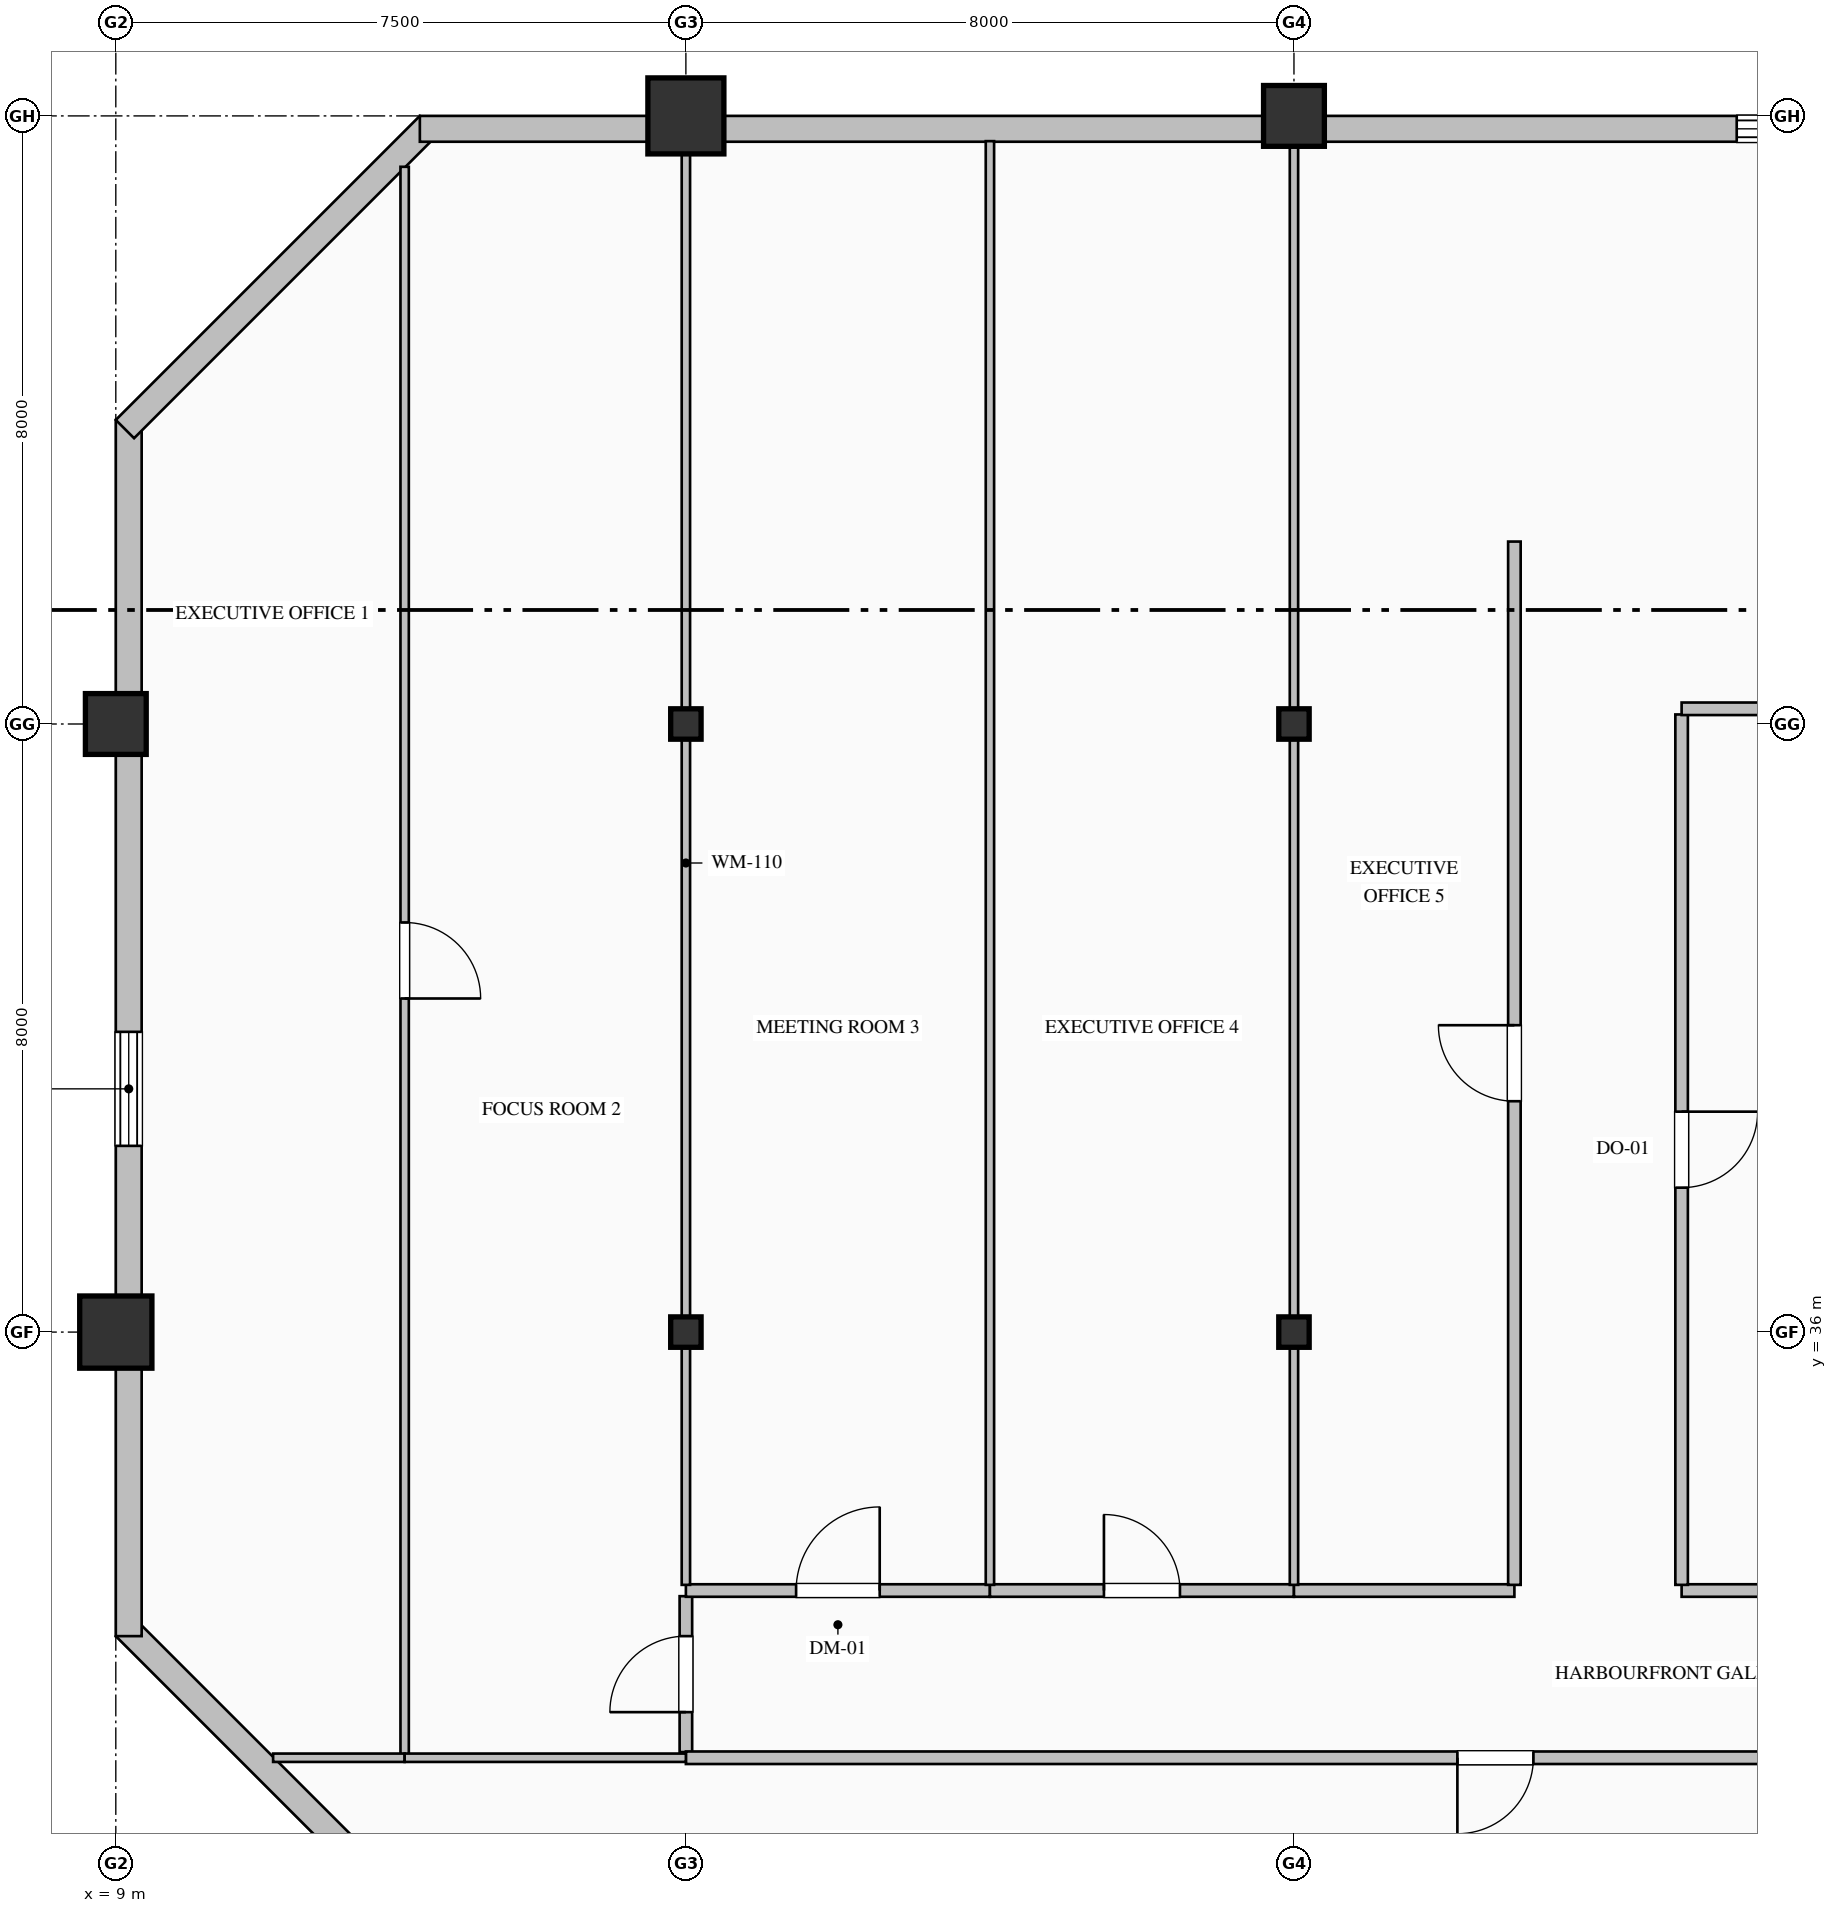
"""IFC4 building model, lengths in metres.
Left out: names, types, materials, properties, quantities, classifications, styles, units other than length and angle.
Written with IfcOpenShell. Run it as: python <this file> out.ifc"""

import sys

from ifc_helpers import new_model, si_unit, direction, frame, frame_2d, origin, origin_2d, place, context, subcontext, project, spatial, rectangle, hollow_rectangle, hollow_circle, i_section, extrude, element, fill, save


model = new_model("IFC4")
c1 = context("Model", 3, precision=1e-05, world=origin(), true_north=direction((0.0, 1.0)))
c2 = subcontext(c1, "Body", "Model", "MODEL_VIEW")
j1 = project(units=[si_unit("LENGTHUNIT", "METRE"), si_unit("PLANEANGLEUNIT", "RADIAN")], contexts=[c1])
p1 = place(None, origin())
s1 = spatial("IfcSite", under=j1, at=p1, CompositionType="ELEMENT")
p2 = place(p1, origin())
s2 = spatial("IfcBuilding", under=s1, at=p2, CompositionType="ELEMENT")
p3 = place(p2, frame((0.0, 0.0, 205.8)))
s3 = spatial("IfcBuildingStorey", under=s2, at=p3, CompositionType="ELEMENT", Elevation=205.8)
p4 = place(p3, frame((9.0, 36.0, 0.0), z_axis=(0.0, 0.0, 1.0), x_axis=(1.0, 0.0, 0.0)))
e1 = element("IfcColumn", 1, at=p4, inside=s3, PredefinedType="COLUMN", context=c2, shape_type="SweptSolid", body=[
    extrude(hollow_rectangle(XDim=0.95, YDim=0.95, WallThickness=0.036, at=origin_2d()), origin(), (0.0, 0.0, 1.0), 4.0),
])
p5 = place(p3, frame((9.0, 44.0, 0.0), z_axis=(0.0, 0.0, 1.0), x_axis=(1.0, 0.0, 0.0)))
e2 = element("IfcColumn", 2, at=p5, inside=s3, PredefinedType="COLUMN", context=c2, shape_type="SweptSolid", body=[
    extrude(hollow_rectangle(XDim=0.8, YDim=0.8, WallThickness=0.032, at=origin_2d()), origin(), (0.0, 0.0, 1.0), 4.0),
])
for number, where, z_axis, x_axis in (
    (3, (16.5, 36.0, 0.0), (0.0, 0.0, 1.0), (1.0, 0.0, 0.0)),
    (4, (16.5, 44.0, 0.0), (0.0, 0.0, 1.0), (1.0, 0.0, 0.0)),
):
    element("IfcColumn", number, at=place(p3, frame(where, z_axis=z_axis, x_axis=x_axis)), inside=s3, PredefinedType="COLUMN", context=c2, shape_type="SweptSolid", body=[
        extrude(i_section(OverallWidth=0.4, OverallDepth=0.4, WebThickness=0.013, FlangeThickness=0.021, FilletRadius=0.022, at=origin_2d()), origin(), (0.0, 0.0, 1.0), 4.0),
    ])
p6 = place(p3, frame((16.5, 52.0, 0.0), z_axis=(0.0, 0.0, 1.0), x_axis=(1.0, 0.0, 0.0)))
e5 = element("IfcColumn", 5, at=p6, inside=s3, PredefinedType="COLUMN", context=c2, shape_type="SweptSolid", body=[
    extrude(hollow_circle(Radius=0.5, WallThickness=0.036, at=origin_2d()), origin(), (0.0, 0.0, 1.0), 4.0),
])
for number, where, z_axis, x_axis in (
    (6, (24.5, 36.0, 0.0), (0.0, 0.0, 1.0), (1.0, 0.0, 0.0)),
    (7, (24.5, 44.0, 0.0), (0.0, 0.0, 1.0), (1.0, 0.0, 0.0)),
):
    element("IfcColumn", number, at=place(p3, frame(where, z_axis=z_axis, x_axis=x_axis)), inside=s3, PredefinedType="COLUMN", context=c2, shape_type="SweptSolid", body=[
        extrude(i_section(OverallWidth=0.4, OverallDepth=0.4, WebThickness=0.013, FlangeThickness=0.021, FilletRadius=0.022, at=origin_2d()), origin(), (0.0, 0.0, 1.0), 4.0),
    ])
p7 = place(p3, frame((24.5, 52.0, 0.0), z_axis=(0.0, 0.0, 1.0), x_axis=(1.0, 0.0, 0.0)))
e8 = element("IfcColumn", 8, at=p7, inside=s3, PredefinedType="COLUMN", context=c2, shape_type="SweptSolid", body=[
    extrude(hollow_rectangle(XDim=0.8, YDim=0.8, WallThickness=0.032, at=origin_2d()), origin(), (0.0, 0.0, 1.0), 4.0),
])
p8 = place(p3, frame((13.12, 28.12, 0.0), z_axis=(0.0, 0.0, 1.0), x_axis=(-0.707106781187, 0.707106781187, 0.0)))
e9 = element("IfcWall", 9, at=p8, inside=s3, PredefinedType="SOLIDWALL", context=c2, shape_type="SweptSolid", body=[
    extrude(rectangle(XDim=5.657, YDim=0.34, at=frame_2d((2.828, 0.0))), origin(), (0.0, 0.0, 1.0), 3.775),
])
p9 = place(p3, frame((9.17, 32.0, 0.0), z_axis=(0.0, 0.0, 1.0), x_axis=(0.0, 1.0, 0.0)))
e10 = element("IfcWall", 10, at=p9, inside=s3, PredefinedType="SOLIDWALL", context=c2, shape_type="SweptSolid", body=[
    extrude(rectangle(XDim=16.0, YDim=0.34, at=frame_2d((8.0, 0.0))), origin(), (0.0, 0.0, 1.0), 3.325),
])
p10 = place(p9, frame((6.45, 0.0, 0.7)))
e11 = element("IfcOpeningElement", 11, at=p10, cuts=e10, PredefinedType="OPENING", context=c2, shape_type="SweptSolid", body=[
    extrude(rectangle(XDim=1.5, YDim=2.4, at=frame_2d((0.75, 1.2))), frame((0.0, 0.18, 0.0), z_axis=(0.0, -1.0, 0.0), x_axis=(1.0, 0.0, 0.0)), (0.0, 0.0, 1.0), 0.36),
])
p11 = place(p3, frame((9.12, 47.88, 0.0), z_axis=(0.0, 0.0, 1.0), x_axis=(0.707106781187, 0.707106781187, 0.0)))
e12 = element("IfcWall", 12, at=p11, inside=s3, PredefinedType="SOLIDWALL", context=c2, shape_type="SweptSolid", body=[
    extrude(rectangle(XDim=5.657, YDim=0.34, at=frame_2d((2.828, 0.0))), origin(), (0.0, 0.0, 1.0), 3.775),
])
p12 = place(p3, frame((13.0, 51.83, 0.0), z_axis=(0.0, 0.0, 1.0), x_axis=(1.0, 0.0, 0.0)))
e13 = element("IfcWall", 13, at=p12, inside=s3, PredefinedType="SOLIDWALL", context=c2, shape_type="SweptSolid", body=[
    extrude(rectangle(XDim=27.52, YDim=0.34, at=frame_2d((13.76, 0.0))), origin(), (0.0, 0.0, 1.0), 3.325),
])
p13 = place(p12, frame((17.325, 0.0, 0.9)))
e14 = element("IfcOpeningElement", 14, at=p13, cuts=e13, PredefinedType="OPENING", context=c2, shape_type="SweptSolid", body=[
    extrude(rectangle(XDim=1.35, YDim=1.85, at=frame_2d((0.675, 0.925))), frame((0.0, 0.18, 0.0), z_axis=(0.0, -1.0, 0.0), x_axis=(1.0, 0.0, 0.0)), (0.0, 0.0, 1.0), 0.36),
])
p14 = place(p3, frame((29.6, 32.6, 0.0), z_axis=(0.0, 0.0, 1.0), x_axis=(1.0, 0.0, 0.0)))
e15 = element("IfcWall", 15, at=p14, inside=s3, PredefinedType="PARTITIONING", context=c2, shape_type="SweptSolid", body=[
    extrude(rectangle(XDim=8.2, YDim=0.165, at=frame_2d((4.1, 0.0))), origin(), (0.0, 0.0, 1.0), 3.775),
])
p15 = place(p3, frame((16.5, 30.475, 0.0), z_axis=(0.0, 0.0, 1.0), x_axis=(0.0, 1.0, 0.0)))
e16 = element("IfcWall", 16, at=p15, inside=s3, PredefinedType="PARTITIONING", context=c2, shape_type="SweptSolid", body=[
    extrude(rectangle(XDim=2.051, YDim=0.165, at=frame_2d((1.025, 0.0))), origin(), (0.0, 0.0, 1.0), 3.179),
])
p16 = place(p15, frame((0.525, 0.0, 0.0)))
e17 = element("IfcOpeningElement", 17, at=p16, cuts=e16, PredefinedType="OPENING", context=c2, shape_type="SweptSolid", body=[
    extrude(rectangle(XDim=1.0, YDim=2.15, at=frame_2d((0.5, 1.075))), frame((0.0, 0.093, 0.0), z_axis=(0.0, -1.0, 0.0), x_axis=(1.0, 0.0, 0.0)), (0.0, 0.0, 1.0), 0.185),
])
p17 = place(p3, frame((16.5, 32.6, 0.0), z_axis=(0.0, 0.0, 1.0), x_axis=(1.0, 0.0, 0.0)))
e18 = element("IfcWall", 18, at=p17, inside=s3, PredefinedType="PARTITIONING", context=c2, shape_type="SweptSolid", body=[
    extrude(rectangle(XDim=4.0, YDim=0.165, at=frame_2d((2.0, 0.0))), origin(), (0.0, 0.0, 1.0), 3.775),
])
p18 = place(p17, frame((1.45, 0.0, 0.0)))
e19 = element("IfcOpeningElement", 19, at=p18, cuts=e18, PredefinedType="OPENING", context=c2, shape_type="SweptSolid", body=[
    extrude(rectangle(XDim=1.1, YDim=2.2, at=frame_2d((0.55, 1.1))), frame((0.0, 0.093, 0.0), z_axis=(0.0, -1.0, 0.0), x_axis=(1.0, 0.0, 0.0)), (0.0, 0.0, 1.0), 0.185),
])
p19 = place(p3, frame((20.5, 32.6, 0.0), z_axis=(0.0, 0.0, 1.0), x_axis=(1.0, 0.0, 0.0)))
e20 = element("IfcWall", 20, at=p19, inside=s3, PredefinedType="PARTITIONING", context=c2, shape_type="SweptSolid", body=[
    extrude(rectangle(XDim=4.0, YDim=0.165, at=frame_2d((2.0, 0.0))), origin(), (0.0, 0.0, 1.0), 3.775),
])
p20 = place(p19, frame((1.5, 0.0, 0.0)))
e21 = element("IfcOpeningElement", 21, at=p20, cuts=e20, PredefinedType="OPENING", context=c2, shape_type="SweptSolid", body=[
    extrude(rectangle(XDim=1.0, YDim=2.15, at=frame_2d((0.5, 1.075))), frame((0.0, 0.093, 0.0), z_axis=(0.0, -1.0, 0.0), x_axis=(1.0, 0.0, 0.0)), (0.0, 0.0, 1.0), 0.185),
])
p21 = place(p3, frame((24.5, 32.6, 0.0), z_axis=(0.0, 0.0, 1.0), x_axis=(1.0, 0.0, 0.0)))
e22 = element("IfcWall", 22, at=p21, inside=s3, PredefinedType="PARTITIONING", context=c2, shape_type="SweptSolid", body=[
    extrude(rectangle(XDim=2.9, YDim=0.165, at=frame_2d((1.45, 0.0))), origin(), (0.0, 0.0, 1.0), 3.775),
])
p22 = place(p3, frame((37.8, 30.4, 0.0), z_axis=(0.0, 0.0, 1.0), x_axis=(-1.0, 0.0, 0.0)))
e23 = element("IfcWall", 23, at=p22, inside=s3, PredefinedType="PARTITIONING", context=c2, shape_type="SweptSolid", body=[
    extrude(rectangle(XDim=21.3, YDim=0.165, at=frame_2d((10.65, 0.0))), origin(), (0.0, 0.0, 1.0), 3.775),
])
p23 = place(p22, frame((10.15, 0.0, 0.0)))
e24 = element("IfcOpeningElement", 24, at=p23, cuts=e23, PredefinedType="OPENING", context=c2, shape_type="SweptSolid", body=[
    extrude(rectangle(XDim=1.0, YDim=2.15, at=frame_2d((0.5, 1.075))), frame((0.0, 0.093, 0.0), z_axis=(0.0, -1.0, 0.0), x_axis=(1.0, 0.0, 0.0)), (0.0, 0.0, 1.0), 0.185),
])
p24 = place(p3, frame((29.6, 44.125, 0.0), z_axis=(0.0, 0.0, 1.0), x_axis=(0.0, -1.0, 0.0)))
e25 = element("IfcWall", 25, at=p24, inside=s3, PredefinedType="PARTITIONING", context=c2, shape_type="SweptSolid", body=[
    extrude(rectangle(XDim=11.451, YDim=0.165, at=frame_2d((5.726, 0.0))), origin(), (0.0, 0.0, 1.0), 3.775),
])
p25 = place(p24, frame((5.226, 0.0, 0.0)))
e26 = element("IfcOpeningElement", 26, at=p25, cuts=e25, PredefinedType="OPENING", context=c2, shape_type="SweptSolid", body=[
    extrude(rectangle(XDim=1.0, YDim=2.15, at=frame_2d((0.5, 1.075))), frame((0.0, 0.093, 0.0), z_axis=(0.0, -1.0, 0.0), x_axis=(1.0, 0.0, 0.0)), (0.0, 0.0, 1.0), 0.185),
])
p26 = place(p3, frame((27.4, 32.675, 0.0), z_axis=(0.0, 0.0, 1.0), x_axis=(0.0, 1.0, 0.0)))
e27 = element("IfcWall", 27, at=p26, inside=s3, PredefinedType="PARTITIONING", context=c2, shape_type="SweptSolid", body=[
    extrude(rectangle(XDim=13.725, YDim=0.165, at=frame_2d((6.863, 0.0))), origin(), (0.0, 0.0, 1.0), 3.775),
])
p27 = place(p26, frame((6.363, 0.0, 0.0)))
e28 = element("IfcOpeningElement", 28, at=p27, cuts=e27, PredefinedType="OPENING", context=c2, shape_type="SweptSolid", body=[
    extrude(rectangle(XDim=1.0, YDim=2.15, at=frame_2d((0.5, 1.075))), frame((0.0, 0.093, 0.0), z_axis=(0.0, -1.0, 0.0), x_axis=(1.0, 0.0, 0.0)), (0.0, 0.0, 1.0), 0.185),
])
p28 = place(p3, frame((37.8, 44.2, 0.0), z_axis=(0.0, 0.0, 1.0), x_axis=(-1.0, 0.0, 0.0)))
e29 = element("IfcWall", 29, at=p28, inside=s3, PredefinedType="PARTITIONING", context=c2, shape_type="SweptSolid", body=[
    extrude(rectangle(XDim=8.2, YDim=0.165, at=frame_2d((4.1, 0.0))), origin(), (0.0, 0.0, 1.0), 3.775),
])
p29 = place(p3, frame((12.8, 51.331, 0.0), z_axis=(0.0, 0.0, 1.0), x_axis=(0.0, -1.0, 0.0)))
e30 = element("IfcWall", 30, at=p29, inside=s3, PredefinedType="MOVABLE", context=c2, shape_type="SweptSolid", body=[
    extrude(rectangle(XDim=20.884, YDim=0.11, at=frame_2d((10.442, 0.0))), origin(), (0.0, 0.0, 1.0), 3.775),
])
p30 = place(p29, frame((9.942, 0.0, 0.0)))
e31 = element("IfcOpeningElement", 31, at=p30, cuts=e30, PredefinedType="OPENING", context=c2, shape_type="SweptSolid", body=[
    extrude(rectangle(XDim=1.0, YDim=2.15, at=frame_2d((0.5, 1.075))), frame((0.0, 0.065, 0.0), z_axis=(0.0, -1.0, 0.0), x_axis=(1.0, 0.0, 0.0)), (0.0, 0.0, 1.0), 0.13),
])
p31 = place(p3, frame((12.8, 30.4, 0.0), z_axis=(0.0, 0.0, 1.0), x_axis=(-1.0, 0.0, 0.0)))
e32 = element("IfcWall", 32, at=p31, inside=s3, PredefinedType="MOVABLE", context=c2, shape_type="SweptSolid", body=[
    extrude(rectangle(XDim=1.73, YDim=0.11, at=frame_2d((0.865, 0.0))), origin(), (0.0, 0.0, 1.0), 3.775),
])
p32 = place(p3, frame((16.5, 51.668, 0.0), z_axis=(0.0, 0.0, 1.0), x_axis=(0.0, -1.0, 0.0)))
e33 = element("IfcWall", 33, at=p32, inside=s3, PredefinedType="MOVABLE", context=c2, shape_type="SweptSolid", body=[
    extrude(rectangle(XDim=18.993, YDim=0.11, at=frame_2d((9.497, 0.0))), origin(), (0.0, 0.0, 1.0), 3.179),
])
p33 = place(p3, frame((16.5, 30.4, 0.0), z_axis=(0.0, 0.0, 1.0), x_axis=(-1.0, 0.0, 0.0)))
e34 = element("IfcWall", 34, at=p33, inside=s3, PredefinedType="MOVABLE", context=c2, shape_type="SweptSolid", body=[
    extrude(rectangle(XDim=3.7, YDim=0.11, at=frame_2d((1.85, 0.0))), origin(), (0.0, 0.0, 1.0), 3.775),
])
p34 = place(p3, frame((20.5, 51.668, 0.0), z_axis=(0.0, 0.0, 1.0), x_axis=(0.0, -1.0, 0.0)))
e35 = element("IfcWall", 35, at=p34, inside=s3, PredefinedType="MOVABLE", context=c2, shape_type="SweptSolid", body=[
    extrude(rectangle(XDim=18.993, YDim=0.11, at=frame_2d((9.497, 0.0))), origin(), (0.0, 0.0, 1.0), 3.775),
])
p35 = place(p3, frame((24.5, 51.668, 0.0), z_axis=(0.0, 0.0, 1.0), x_axis=(0.0, -1.0, 0.0)))
e36 = element("IfcWall", 36, at=p35, inside=s3, PredefinedType="MOVABLE", context=c2, shape_type="SweptSolid", body=[
    extrude(rectangle(XDim=18.993, YDim=0.11, at=frame_2d((9.497, 0.0))), origin(), (0.0, 0.0, 1.0), 3.179),
])
p36 = place(p10, origin())
e37 = element("IfcWindow", 37, at=p36, inside=s3, PartitioningType="DOUBLE_PANEL_HORIZONTAL", PredefinedType="WINDOW", context=c2, shape_type="SweptSolid", body=[
    extrude(rectangle(XDim=1.5, YDim=2.4, at=frame_2d((0.75, 1.2))), frame((0.0, 0.15, 0.0), z_axis=(0.0, -1.0, 0.0), x_axis=(1.0, 0.0, 0.0)), (0.0, 0.0, 1.0), 0.06),
])
fill(e11, e37)
p37 = place(p13, origin())
e38 = element("IfcWindow", 38, at=p37, inside=s3, PartitioningType="DOUBLE_PANEL_VERTICAL", PredefinedType="WINDOW", context=c2, shape_type="SweptSolid", body=[
    extrude(rectangle(XDim=1.35, YDim=1.85, at=frame_2d((0.675, 0.925))), frame((0.0, 0.15, 0.0), z_axis=(0.0, -1.0, 0.0), x_axis=(1.0, 0.0, 0.0)), (0.0, 0.0, 1.0), 0.06),
])
fill(e14, e38)
p38 = place(p25, origin())
e39 = element("IfcDoor", 39, at=p38, inside=s3, OperationType="SINGLE_SWING_LEFT", PredefinedType="DOOR", context=c2, shape_type="SweptSolid", body=[
    extrude(rectangle(XDim=1.0, YDim=2.15, at=frame_2d((0.5, 1.075))), frame((0.0, 0.025, 0.0), z_axis=(0.0, -1.0, 0.0), x_axis=(1.0, 0.0, 0.0)), (0.0, 0.0, 1.0), 0.05),
])
fill(e26, e39)
p39 = place(p30, origin())
e40 = element("IfcDoor", 40, at=p39, inside=s3, OperationType="SINGLE_SWING_RIGHT", PredefinedType="DOOR", context=c2, shape_type="SweptSolid", body=[
    extrude(rectangle(XDim=1.0, YDim=2.15, at=frame_2d((0.5, 1.075))), frame((0.0, 0.025, 0.0), z_axis=(0.0, -1.0, 0.0), x_axis=(1.0, 0.0, 0.0)), (0.0, 0.0, 1.0), 0.05),
])
fill(e31, e40)
p40 = place(p16, origin())
e41 = element("IfcDoor", 41, at=p40, inside=s3, OperationType="SINGLE_SWING_LEFT", PredefinedType="DOOR", context=c2, shape_type="SweptSolid", body=[
    extrude(rectangle(XDim=1.0, YDim=2.15, at=frame_2d((0.5, 1.075))), frame((0.0, 0.025, 0.0), z_axis=(0.0, -1.0, 0.0), x_axis=(1.0, 0.0, 0.0)), (0.0, 0.0, 1.0), 0.05),
])
fill(e17, e41)
p41 = place(p18, origin())
e42 = element("IfcDoor", 42, at=p41, inside=s3, OperationType="SINGLE_SWING_RIGHT", PredefinedType="DOOR", context=c2, shape_type="SweptSolid", body=[
    extrude(rectangle(XDim=1.1, YDim=2.2, at=frame_2d((0.55, 1.1))), frame((0.0, 0.025, 0.0), z_axis=(0.0, -1.0, 0.0), x_axis=(1.0, 0.0, 0.0)), (0.0, 0.0, 1.0), 0.05),
])
fill(e19, e42)
p42 = place(p20, origin())
e43 = element("IfcDoor", 43, at=p42, inside=s3, OperationType="SINGLE_SWING_LEFT", PredefinedType="DOOR", context=c2, shape_type="SweptSolid", body=[
    extrude(rectangle(XDim=1.0, YDim=2.15, at=frame_2d((0.5, 1.075))), frame((0.0, 0.025, 0.0), z_axis=(0.0, -1.0, 0.0), x_axis=(1.0, 0.0, 0.0)), (0.0, 0.0, 1.0), 0.05),
])
fill(e21, e43)
p43 = place(p27, origin())
e44 = element("IfcDoor", 44, at=p43, inside=s3, OperationType="SINGLE_SWING_RIGHT", PredefinedType="DOOR", context=c2, shape_type="SweptSolid", body=[
    extrude(rectangle(XDim=1.0, YDim=2.15, at=frame_2d((0.5, 1.075))), frame((0.0, 0.025, 0.0), z_axis=(0.0, -1.0, 0.0), x_axis=(1.0, 0.0, 0.0)), (0.0, 0.0, 1.0), 0.05),
])
fill(e28, e44)
p44 = place(p23, origin())
e45 = element("IfcDoor", 45, at=p44, inside=s3, OperationType="SINGLE_SWING_RIGHT", PredefinedType="DOOR", context=c2, shape_type="SweptSolid", body=[
    extrude(rectangle(XDim=1.0, YDim=2.15, at=frame_2d((0.5, 1.075))), frame((0.0, 0.025, 0.0), z_axis=(0.0, -1.0, 0.0), x_axis=(1.0, 0.0, 0.0)), (0.0, 0.0, 1.0), 0.05),
])
fill(e24, e45)
save(model, sys.argv[1])
